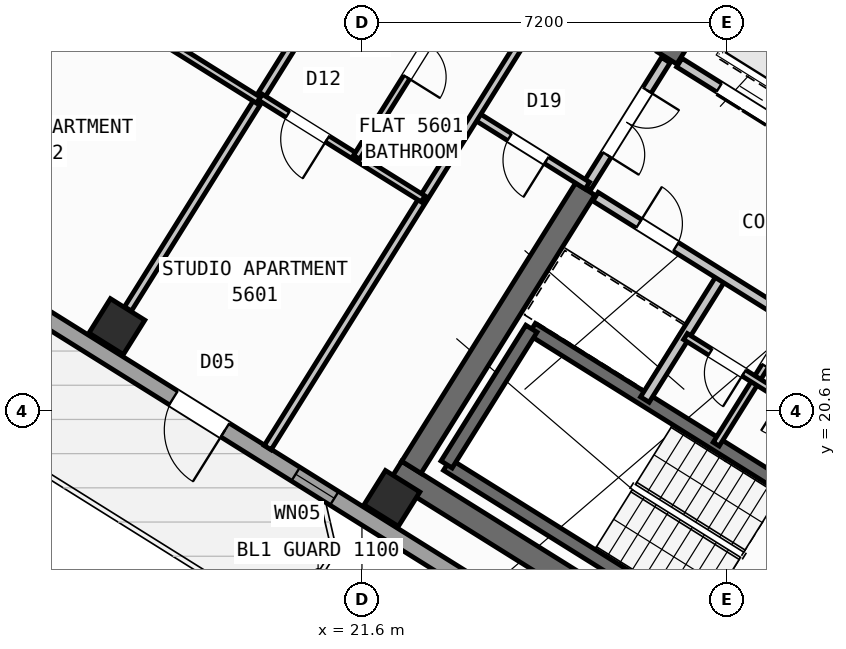
"""IFC4 building model, lengths in metres.
Left out: names, types, materials, properties, quantities, classifications, styles, units other than length and angle.
Written with IfcOpenShell. Run it as: python <this file> out.ifc"""

import sys

from ifc_helpers import new_model, si_unit, direction, frame, frame_2d, origin, origin_2d, place, context, subcontext, project, spatial, rectangle, hollow_rectangle, extrude, source, transform, mapped, element, fill, save


model = new_model("IFC4")
c1 = context("Model", 3, precision=1e-05, world=origin(), true_north=direction((0.0, 1.0)))
c2 = subcontext(c1, "Body", "Model", "MODEL_VIEW")
j1 = project(units=[si_unit("LENGTHUNIT", "METRE"), si_unit("PLANEANGLEUNIT", "RADIAN")], contexts=[c1])
p1 = place(None, origin())
s1 = spatial("IfcSite", under=j1, at=p1, CompositionType="ELEMENT")
p2 = place(p1, origin())
s2 = spatial("IfcBuilding", under=s1, at=p2, CompositionType="ELEMENT")
p3 = place(p2, frame((0.0, 0.0, 222.0)))
s3 = spatial("IfcBuildingStorey", under=s2, at=p3, CompositionType="ELEMENT", Elevation=222.0)
p4 = place(p3, frame((40.531, 24.036, 0.0), z_axis=(0.0, 0.0, 1.0), x_axis=(-0.848048787466, 0.529918157905, 0.0)))
e1 = element("IfcWall", 1, at=p4, inside=s3, PredefinedType="SHEAR", context=c2, shape_type="SweptSolid", body=[
    extrude(rectangle(XDim=13.04, YDim=0.45, at=frame_2d((6.52, 0.0))), origin(), (0.0, 0.0, 1.0), 3.35),
])
p5 = place(p3, frame((33.324, 12.503, 0.0), z_axis=(0.0, 0.0, 1.0), x_axis=(-0.848043529849, 0.529926571782, 0.0)))
e2 = element("IfcWall", 2, at=p5, inside=s3, PredefinedType="SHEAR", context=c2, shape_type="SweptSolid", body=[
    extrude(rectangle(XDim=13.04, YDim=0.45, at=frame_2d((6.52, 0.0))), origin(), (0.0, 0.0, 1.0), 3.35),
])
p6 = place(p3, frame((29.544, 30.636, 0.0), z_axis=(0.0, 0.0, 1.0), x_axis=(-0.529902075036, -0.848058836916, 0.0)))
e3 = element("IfcWall", 3, at=p6, inside=s3, PredefinedType="SHEAR", context=c2, shape_type="SweptSolid", body=[
    extrude(rectangle(XDim=3.625, YDim=0.45, at=frame_2d((1.812, 0.0))), origin(), (0.0, 0.0, 1.0), 3.35),
])
p7 = place(p3, frame((26.007, 24.976, 0.0), z_axis=(0.0, 0.0, 1.0), x_axis=(-0.529931155655, -0.848040665456, 0.0)))
e4 = element("IfcWall", 4, at=p7, inside=s3, PredefinedType="SHEAR", context=c2, shape_type="SweptSolid", body=[
    extrude(rectangle(XDim=6.475, YDim=0.45, at=frame_2d((3.238, 0.0))), origin(), (0.0, 0.0, 1.0), 3.35),
])
m1 = source(origin(), c2, "Body", "SweptSolid", [
    extrude(hollow_rectangle(XDim=0.8, YDim=0.8, WallThickness=0.032, at=origin_2d()), origin(), (0.0, 0.0, 1.0), 3.6),
])
for number, where, z_axis, x_axis in (
    (5, (22.191, 18.87, 0.0), (0.0, 0.0, 1.0), (-0.848, 0.53, 0.0)),
    (6, (16.764, 22.261, 0.0), (0.0, 0.0, 1.0), (-0.848, 0.53, 0.0)),
):
    element("IfcColumn", number, at=place(p3, frame(where, z_axis=z_axis, x_axis=x_axis)), inside=s3, PredefinedType="COLUMN", context=c2, shape_type="MappedRepresentation", body=[
        mapped(m1, transform((0.0, 0.0, 0.0), scale=1.0)),
    ])
p8 = place(p3, frame((31.76, 12.183, 0.0), z_axis=(0.0, 0.0, 1.0), x_axis=(-0.848047074256, 0.529920899612, 0.0)))
e7 = element("IfcWall", 7, at=p8, inside=s3, PredefinedType="STANDARD", context=c2, shape_type="SweptSolid", body=[
    extrude(rectangle(XDim=30.652, YDim=0.32, at=frame_2d((15.326, 0.0))), origin(), (0.0, 0.0, 1.0), 3.35),
])
p9 = place(p8, frame((15.166, 0.0, 0.0)))
e8 = element("IfcOpeningElement", 8, at=p9, cuts=e7, PredefinedType="OPENING", context=c2, shape_type="SweptSolid", body=[
    extrude(rectangle(XDim=1.2, YDim=2.15, at=frame_2d((0.6, 1.075))), frame((0.0, 0.17, 0.0), z_axis=(0.0, -1.0, 0.0), x_axis=(1.0, 0.0, 0.0)), (0.0, 0.0, 1.0), 0.34),
])
p10 = place(p8, frame((2.24, 0.0, 0.9)))
e9 = element("IfcOpeningElement", 9, at=p10, cuts=e7, PredefinedType="OPENING", context=c2, shape_type="SweptSolid", body=[
    extrude(rectangle(XDim=1.65, YDim=1.45, at=frame_2d((0.825, 0.725))), frame((0.0, 0.17, 0.0), z_axis=(0.0, -1.0, 0.0), x_axis=(1.0, 0.0, 0.0)), (0.0, 0.0, 1.0), 0.34),
])
p11 = place(p8, frame((7.469, 0.0, 0.9)))
e10 = element("IfcOpeningElement", 10, at=p11, cuts=e7, PredefinedType="OPENING", context=c2, shape_type="SweptSolid", body=[
    extrude(rectangle(XDim=1.65, YDim=1.45, at=frame_2d((0.825, 0.725))), frame((0.0, 0.17, 0.0), z_axis=(0.0, -1.0, 0.0), x_axis=(1.0, 0.0, 0.0)), (0.0, 0.0, 1.0), 0.34),
])
p12 = place(p8, frame((12.623, 0.0, 1.0)))
e11 = element("IfcOpeningElement", 11, at=p12, cuts=e7, PredefinedType="OPENING", context=c2, shape_type="SweptSolid", body=[
    extrude(rectangle(XDim=0.9, YDim=1.25, at=frame_2d((0.45, 0.625))), frame((0.0, 0.17, 0.0), z_axis=(0.0, -1.0, 0.0), x_axis=(1.0, 0.0, 0.0)), (0.0, 0.0, 1.0), 0.34),
])
p13 = place(p8, frame((19.583, 0.0, 1.0)))
e12 = element("IfcOpeningElement", 12, at=p13, cuts=e7, PredefinedType="OPENING", context=c2, shape_type="SweptSolid", body=[
    extrude(rectangle(XDim=0.9, YDim=1.25, at=frame_2d((0.45, 0.625))), frame((0.0, 0.17, 0.0), z_axis=(0.0, -1.0, 0.0), x_axis=(1.0, 0.0, 0.0)), (0.0, 0.0, 1.0), 0.34),
])
p14 = place(p8, frame((22.033, 0.0, 1.0)))
e13 = element("IfcOpeningElement", 13, at=p14, cuts=e7, PredefinedType="OPENING", context=c2, shape_type="SweptSolid", body=[
    extrude(rectangle(XDim=0.9, YDim=1.25, at=frame_2d((0.45, 0.625))), frame((0.0, 0.17, 0.0), z_axis=(0.0, -1.0, 0.0), x_axis=(1.0, 0.0, 0.0)), (0.0, 0.0, 1.0), 0.34),
])
p15 = place(p8, frame((27.666, 0.0, 0.9)))
e14 = element("IfcOpeningElement", 14, at=p15, cuts=e7, PredefinedType="OPENING", context=c2, shape_type="SweptSolid", body=[
    extrude(rectangle(XDim=1.35, YDim=1.45, at=frame_2d((0.675, 0.725))), frame((0.0, 0.17, 0.0), z_axis=(0.0, -1.0, 0.0), x_axis=(1.0, 0.0, 0.0)), (0.0, 0.0, 1.0), 0.34),
])
p16 = place(p3, frame((29.605, 15.581, 0.0), z_axis=(0.0, 0.0, 1.0), x_axis=(-0.848036911448, 0.529937163087, 0.0)))
e15 = element("IfcWall", 15, at=p16, inside=s3, PredefinedType="SHEAR", context=c2, shape_type="SweptSolid", body=[
    extrude(rectangle(XDim=7.46, YDim=0.26, at=frame_2d((3.73, 0.0))), origin(), (0.0, 0.0, 1.0), 3.35),
])
p17 = place(p3, frame((31.28, 18.261, 0.0), z_axis=(0.0, 0.0, 1.0), x_axis=(-0.848051618787, 0.529913626805, 0.0)))
e16 = element("IfcWall", 16, at=p17, inside=s3, PredefinedType="SHEAR", context=c2, shape_type="SweptSolid", body=[
    extrude(rectangle(XDim=7.46, YDim=0.26, at=frame_2d((3.73, 0.0))), origin(), (0.0, 0.0, 1.0), 3.35),
])
p18 = place(p17, frame((0.36, 0.0, 0.0)))
e17 = element("IfcOpeningElement", 17, at=p18, cuts=e16, PredefinedType="OPENING", context=c2, shape_type="SweptSolid", body=[
    extrude(rectangle(XDim=0.86, YDim=2.05, at=frame_2d((0.43, 1.025))), frame((0.0, 0.14, 0.0), z_axis=(0.0, -1.0, 0.0), x_axis=(1.0, 0.0, 0.0)), (0.0, 0.0, 1.0), 0.28),
])
p19 = place(p3, frame((31.288, 18.256, 0.0), z_axis=(0.0, 0.0, 1.0), x_axis=(-0.529943379326, -0.848033026897, 0.0)))
e18 = element("IfcWall", 18, at=p19, inside=s3, PredefinedType="SHEAR", context=c2, shape_type="SweptSolid", body=[
    extrude(rectangle(XDim=3.16, YDim=0.26, at=frame_2d((1.58, 0.0))), origin(), (0.0, 0.0, 1.0), 3.35),
])
p20 = place(p3, frame((24.945, 22.22, 0.0), z_axis=(0.0, 0.0, 1.0), x_axis=(-0.529908658664, -0.84805472316, 0.0)))
e19 = element("IfcWall", 19, at=p20, inside=s3, PredefinedType="SHEAR", context=c2, shape_type="SweptSolid", body=[
    extrude(rectangle(XDim=3.16, YDim=0.26, at=frame_2d((1.58, 0.0))), origin(), (0.0, 0.0, 1.0), 3.35),
])
p21 = place(p3, frame((31.822, 24.998, 0.0), z_axis=(0.0, 0.0, 1.0), x_axis=(-0.848054125777, 0.529909614701, 0.0)))
e20 = element("IfcWall", 20, at=p21, inside=s3, PredefinedType="STANDARD", context=c2, shape_type="SweptSolid", body=[
    extrude(rectangle(XDim=4.668, YDim=0.2, at=frame_2d((2.334, 0.0))), origin(), (0.0, 0.0, 1.0), 3.34),
])
p22 = place(p21, frame((0.52, 0.0, 0.0)))
e21 = element("IfcOpeningElement", 21, at=p22, cuts=e20, PredefinedType="OPENING", context=c2, shape_type="SweptSolid", body=[
    extrude(rectangle(XDim=1.2, YDim=2.15, at=frame_2d((0.6, 1.075))), frame((0.0, 0.11, 0.0), z_axis=(0.0, -1.0, 0.0), x_axis=(1.0, 0.0, 0.0)), (0.0, 0.0, 1.0), 0.22),
])
p23 = place(p21, frame((2.54, 0.0, 0.0)))
e22 = element("IfcOpeningElement", 22, at=p23, cuts=e20, PredefinedType="OPENING", context=c2, shape_type="SweptSolid", body=[
    extrude(rectangle(XDim=1.2, YDim=2.15, at=frame_2d((0.6, 1.075))), frame((0.0, 0.11, 0.0), z_axis=(0.0, -1.0, 0.0), x_axis=(1.0, 0.0, 0.0)), (0.0, 0.0, 1.0), 0.22),
])
p24 = place(p3, frame((33.363, 27.69, 0.0), z_axis=(0.0, 0.0, 1.0), x_axis=(-0.84804957148, 0.529916903215, 0.0)))
e23 = element("IfcWall", 23, at=p24, inside=s3, PredefinedType="STANDARD", context=c2, shape_type="SweptSolid", body=[
    extrude(rectangle(XDim=4.548, YDim=0.2, at=frame_2d((2.274, 0.0))), origin(), (0.0, 0.0, 1.0), 3.34),
])
p25 = place(p3, frame((28.71, 23.263, 0.0), z_axis=(0.0, 0.0, 1.0), x_axis=(-0.529907497854, -0.848055448493, 0.0)))
e24 = element("IfcWall", 24, at=p25, inside=s3, PredefinedType="STANDARD", context=c2, shape_type="SweptSolid", body=[
    extrude(rectangle(XDim=2.88, YDim=0.2, at=frame_2d((1.44, 0.0))), origin(), (0.0, 0.0, 1.0), 3.34),
])
p26 = place(p3, frame((31.525, 21.504, 0.0), z_axis=(0.0, 0.0, 1.0), x_axis=(-0.848042066329, 0.529928913853, 0.0)))
e25 = element("IfcWall", 25, at=p26, inside=s3, PredefinedType="STANDARD", context=c2, shape_type="SweptSolid", body=[
    extrude(rectangle(XDim=6.268, YDim=0.2, at=frame_2d((3.134, 0.0))), origin(), (0.0, 0.0, 1.0), 3.34),
])
p27 = place(p26, frame((4.4, 0.0, 0.0)))
e26 = element("IfcOpeningElement", 26, at=p27, cuts=e25, PredefinedType="OPENING", context=c2, shape_type="SweptSolid", body=[
    extrude(rectangle(XDim=0.86, YDim=2.05, at=frame_2d((0.43, 1.025))), frame((0.0, 0.11, 0.0), z_axis=(0.0, -1.0, 0.0), x_axis=(1.0, 0.0, 0.0)), (0.0, 0.0, 1.0), 0.22),
])
p28 = place(p26, frame((0.35, 0.0, 0.0)))
e27 = element("IfcOpeningElement", 27, at=p28, cuts=e25, PredefinedType="OPENING", context=c2, shape_type="SweptSolid", body=[
    extrude(rectangle(XDim=0.86, YDim=2.05, at=frame_2d((0.43, 1.025))), frame((0.0, 0.11, 0.0), z_axis=(0.0, -1.0, 0.0), x_axis=(1.0, 0.0, 0.0)), (0.0, 0.0, 1.0), 0.22),
])
p29 = place(p3, frame((30.117, 22.384, 0.0), z_axis=(0.0, 0.0, 1.0), x_axis=(-0.529951914384, -0.848027693204, 0.0)))
e28 = element("IfcWall", 28, at=p29, inside=s3, PredefinedType="PLUMBINGWALL", context=c2, shape_type="SweptSolid", body=[
    extrude(rectangle(XDim=1.4, YDim=0.14, at=frame_2d((0.7, 0.0))), origin(), (0.0, 0.0, 1.0), 3.34),
])
p30 = place(p29, frame((0.28, 0.0, 0.0)))
e29 = element("IfcOpeningElement", 29, at=p30, cuts=e28, PredefinedType="OPENING", context=c2, shape_type="SweptSolid", body=[
    extrude(rectangle(XDim=0.78, YDim=2.05, at=frame_2d((0.39, 1.025))), frame((0.0, 0.08, 0.0), z_axis=(0.0, -1.0, 0.0), x_axis=(1.0, 0.0, 0.0)), (0.0, 0.0, 1.0), 0.16),
])
p31 = place(p3, frame((29.375, 21.196, 0.0), z_axis=(0.0, 0.0, 1.0), x_axis=(-0.529865479138, -0.848081702443, 0.0)))
e30 = element("IfcWall", 30, at=p31, inside=s3, PredefinedType="PLUMBINGWALL", context=c2, shape_type="SweptSolid", body=[
    extrude(rectangle(XDim=1.48, YDim=0.14, at=frame_2d((0.74, 0.0))), origin(), (0.0, 0.0, 1.0), 3.34),
])
p32 = place(p3, frame((30.766, 20.327, 0.0), z_axis=(0.0, 0.0, 1.0), x_axis=(-0.848052663127, 0.529911955482, 0.0)))
e31 = element("IfcWall", 31, at=p32, inside=s3, PredefinedType="PLUMBINGWALL", context=c2, shape_type="SweptSolid", body=[
    extrude(rectangle(XDim=3.28, YDim=0.14, at=frame_2d((1.64, 0.0))), origin(), (0.0, 0.0, 1.0), 3.34),
])
p33 = place(p32, frame((0.25, 0.0, 0.0)))
e32 = element("IfcOpeningElement", 32, at=p33, cuts=e31, PredefinedType="OPENING", context=c2, shape_type="SweptSolid", body=[
    extrude(rectangle(XDim=0.78, YDim=2.05, at=frame_2d((0.39, 1.025))), frame((0.0, 0.08, 0.0), z_axis=(0.0, -1.0, 0.0), x_axis=(1.0, 0.0, 0.0)), (0.0, 0.0, 1.0), 0.16),
])
p34 = place(p32, frame((1.92, 0.0, 0.0)))
e33 = element("IfcOpeningElement", 33, at=p34, cuts=e31, PredefinedType="OPENING", context=c2, shape_type="SweptSolid", body=[
    extrude(rectangle(XDim=0.78, YDim=2.05, at=frame_2d((0.39, 1.025))), frame((0.0, 0.08, 0.0), z_axis=(0.0, -1.0, 0.0), x_axis=(1.0, 0.0, 0.0)), (0.0, 0.0, 1.0), 0.16),
])
p35 = place(p3, frame((27.596, 27.52, 0.0), z_axis=(0.0, 0.0, 1.0), x_axis=(-0.529865479138, -0.848081702443, 0.0)))
e34 = element("IfcWall", 34, at=p35, inside=s3, PredefinedType="STANDARD", context=c2, shape_type="SweptSolid", body=[
    extrude(rectangle(XDim=2.96, YDim=0.2, at=frame_2d((1.48, 0.0))), origin(), (0.0, 0.0, 1.0), 3.34),
])
p36 = place(p35, frame((0.7, 0.0, 0.0)))
e35 = element("IfcOpeningElement", 35, at=p36, cuts=e34, PredefinedType="OPENING", context=c2, shape_type="SweptSolid", body=[
    extrude(rectangle(XDim=1.5, YDim=2.15, at=frame_2d((0.75, 1.075))), frame((0.0, 0.11, 0.0), z_axis=(0.0, -1.0, 0.0), x_axis=(1.0, 0.0, 0.0)), (0.0, 0.0, 1.0), 0.22),
])
p37 = place(p3, frame((26.049, 25.044, 0.0), z_axis=(0.0, 0.0, 1.0), x_axis=(-0.848050851465, 0.529914854792, 0.0)))
e36 = element("IfcWall", 36, at=p37, inside=s3, PredefinedType="PARTITIONING", context=c2, shape_type="SweptSolid", body=[
    extrude(rectangle(XDim=2.61, YDim=0.16, at=frame_2d((1.305, 0.0))), origin(), (0.0, 0.0, 1.0), 2.825),
])
p38 = place(p37, frame((0.95, 0.0, 0.0)))
e37 = element("IfcOpeningElement", 37, at=p38, cuts=e36, PredefinedType="OPENING", context=c2, shape_type="SweptSolid", body=[
    extrude(rectangle(XDim=0.86, YDim=2.05, at=frame_2d((0.43, 1.025))), frame((0.0, 0.09, 0.0), z_axis=(0.0, -1.0, 0.0), x_axis=(1.0, 0.0, 0.0)), (0.0, 0.0, 1.0), 0.18),
])
p39 = place(p3, frame((25.198, 28.606, 0.0), z_axis=(0.0, 0.0, 1.0), x_axis=(-0.529926497642, -0.848043576178, 0.0)))
e38 = element("IfcWall", 38, at=p39, inside=s3, PredefinedType="PARTITIONING", context=c2, shape_type="SweptSolid", body=[
    extrude(rectangle(XDim=10.3, YDim=0.16, at=frame_2d((5.15, 0.0))), origin(), (0.0, 0.0, 1.0), 3.34),
])
p40 = place(p3, frame((20.414, 28.103, 0.0), z_axis=(0.0, 0.0, 1.0), x_axis=(-0.529934553702, -0.848038542045, 0.0)))
e39 = element("IfcWall", 39, at=p40, inside=s3, PredefinedType="PARTITIONING", context=c2, shape_type="SweptSolid", body=[
    extrude(rectangle(XDim=6.476, YDim=0.16, at=frame_2d((3.238, 0.0))), origin(), (0.0, 0.0, 1.0), 2.825),
])
p41 = place(p3, frame((22.807, 24.781, 0.0), z_axis=(0.0, 0.0, 1.0), x_axis=(-0.84803087207, 0.529946827537, 0.0)))
e40 = element("IfcWall", 40, at=p41, inside=s3, PredefinedType="PLUMBINGWALL", context=c2, shape_type="SweptSolid", body=[
    extrude(rectangle(XDim=3.79, YDim=0.14, at=frame_2d((1.895, 0.0))), origin(), (0.0, 0.0, 1.0), 3.34),
])
p42 = place(p41, frame((2.23, 0.0, 0.0)))
e41 = element("IfcOpeningElement", 41, at=p42, cuts=e40, PredefinedType="OPENING", context=c2, shape_type="SweptSolid", body=[
    extrude(rectangle(XDim=0.92, YDim=2.08, at=frame_2d((0.46, 1.04))), frame((0.0, 0.08, 0.0), z_axis=(0.0, -1.0, 0.0), x_axis=(1.0, 0.0, 0.0)), (0.0, 0.0, 1.0), 0.16),
])
p43 = place(p3, frame((23.883, 29.427, 0.0), z_axis=(0.0, 0.0, 1.0), x_axis=(-0.529950281337, -0.84802871373, 0.0)))
e42 = element("IfcWall", 42, at=p43, inside=s3, PredefinedType="PLUMBINGWALL", context=c2, shape_type="SweptSolid", body=[
    extrude(rectangle(XDim=4.51, YDim=0.14, at=frame_2d((2.255, 0.0))), origin(), (0.0, 0.0, 1.0), 2.995),
])
p44 = place(p43, frame((1.865, 0.0, 0.0)))
e43 = element("IfcOpeningElement", 43, at=p44, cuts=e42, PredefinedType="OPENING", context=c2, shape_type="SweptSolid", body=[
    extrude(rectangle(XDim=0.78, YDim=2.05, at=frame_2d((0.39, 1.025))), frame((0.0, 0.08, 0.0), z_axis=(0.0, -1.0, 0.0), x_axis=(1.0, 0.0, 0.0)), (0.0, 0.0, 1.0), 0.16),
])
p45 = place(p3, frame((19.556, 26.73, 0.0), z_axis=(0.0, 0.0, 1.0), x_axis=(-0.848043949058, 0.52992590092, 0.0)))
e44 = element("IfcWall", 44, at=p45, inside=s3, PredefinedType="PLUMBINGWALL", context=c2, shape_type="SweptSolid", body=[
    extrude(rectangle(XDim=12.92, YDim=0.14, at=frame_2d((6.46, 0.0))), origin(), (0.0, 0.0, 1.0), 3.34),
])
p46 = place(p45, frame((5.849, 0.0, 0.0)))
e45 = element("IfcOpeningElement", 45, at=p46, cuts=e44, PredefinedType="OPENING", context=c2, shape_type="SweptSolid", body=[
    extrude(rectangle(XDim=0.92, YDim=2.08, at=frame_2d((0.46, 1.04))), frame((0.0, 0.08, 0.0), z_axis=(0.0, -1.0, 0.0), x_axis=(1.0, 0.0, 0.0)), (0.0, 0.0, 1.0), 0.16),
])
p47 = place(p3, frame((41.936, 26.012, 0.0), z_axis=(0.0, 0.0, 1.0), x_axis=(-0.848051154596, 0.529914369676, 0.0)))
e46 = element("IfcWall", 46, at=p47, inside=s3, PredefinedType="PARTITIONING", context=c2, shape_type="SweptSolid", body=[
    extrude(rectangle(XDim=15.57, YDim=0.16, at=frame_2d((7.785, 0.0))), origin(), (0.0, 0.0, 1.0), 3.34),
])
p48 = place(p47, frame((3.415, 0.0, 0.0)))
e47 = element("IfcOpeningElement", 47, at=p48, cuts=e46, PredefinedType="OPENING", context=c2, shape_type="SweptSolid", body=[
    extrude(rectangle(XDim=1.0, YDim=2.1, at=frame_2d((0.5, 1.05))), frame((0.0, 0.09, 0.0), z_axis=(0.0, -1.0, 0.0), x_axis=(1.0, 0.0, 0.0)), (0.0, 0.0, 1.0), 0.18),
])
p49 = place(p47, frame((10.565, 0.0, 0.0)))
e48 = element("IfcOpeningElement", 48, at=p49, cuts=e46, PredefinedType="OPENING", context=c2, shape_type="SweptSolid", body=[
    extrude(rectangle(XDim=1.0, YDim=2.1, at=frame_2d((0.5, 1.05))), frame((0.0, 0.09, 0.0), z_axis=(0.0, -1.0, 0.0), x_axis=(1.0, 0.0, 0.0)), (0.0, 0.0, 1.0), 0.18),
])
m2 = source(origin(), c2, "Body", "SweptSolid", [
    extrude(rectangle(XDim=1.2, YDim=2.15, at=frame_2d((0.6, 1.075))), frame((0.0, 0.025, 0.0), z_axis=(0.0, -1.0, 0.0), x_axis=(1.0, 0.0, 0.0)), (0.0, 0.0, 1.0), 0.05),
])
p50 = place(p9, origin())
e49 = element("IfcDoor", 49, at=p50, inside=s3, OperationType="SINGLE_SWING_LEFT", PredefinedType="DOOR", context=c2, shape_type="MappedRepresentation", body=[
    mapped(m2, transform((0.0, 0.0, 0.0), scale=1.0)),
])
fill(e8, e49)
m3 = source(origin(), c2, "Body", "SweptSolid", [
    extrude(rectangle(XDim=0.9, YDim=1.25, at=frame_2d((0.45, 0.625))), frame((0.0, 0.03, 0.0), z_axis=(0.0, -1.0, 0.0), x_axis=(1.0, 0.0, 0.0)), (0.0, 0.0, 1.0), 0.06),
])
p51 = place(p12, origin())
e50 = element("IfcWindow", 50, at=p51, inside=s3, PartitioningType="SINGLE_PANEL", PredefinedType="WINDOW", context=c2, shape_type="MappedRepresentation", body=[
    mapped(m3, transform((0.0, 0.0, 0.0), scale=1.0)),
])
fill(e11, e50)
p52 = place(p23, origin())
e51 = element("IfcDoor", 51, at=p52, inside=s3, OperationType="DOUBLE_DOOR_SLIDING", PredefinedType="DOOR", context=c2, shape_type="MappedRepresentation", body=[
    mapped(m2, transform((0.0, 0.0, 0.0), scale=1.0)),
])
fill(e22, e51)
m4 = source(origin(), c2, "Body", "SweptSolid", [
    extrude(rectangle(XDim=0.86, YDim=2.05, at=frame_2d((0.43, 1.025))), frame((0.0, 0.025, 0.0), z_axis=(0.0, -1.0, 0.0), x_axis=(1.0, 0.0, 0.0)), (0.0, 0.0, 1.0), 0.05),
])
p53 = place(p27, frame((0.86, 0.0, 0.0), z_axis=(0.0, 0.0, 1.0), x_axis=(-1.0, 0.0, 0.0)))
e52 = element("IfcDoor", 52, at=p53, inside=s3, OperationType="SINGLE_SWING_LEFT", PredefinedType="DOOR", context=c2, shape_type="MappedRepresentation", body=[
    mapped(m4, transform((0.0, 0.0, 0.0), scale=1.0)),
])
fill(e26, e52)
m5 = source(origin(), c2, "Body", "SweptSolid", [
    extrude(rectangle(XDim=0.78, YDim=2.05, at=frame_2d((0.39, 1.025))), frame((0.0, 0.025, 0.0), z_axis=(0.0, -1.0, 0.0), x_axis=(1.0, 0.0, 0.0)), (0.0, 0.0, 1.0), 0.05),
])
p54 = place(p30, origin())
e53 = element("IfcDoor", 53, at=p54, inside=s3, OperationType="SINGLE_SWING_LEFT", PredefinedType="DOOR", context=c2, shape_type="MappedRepresentation", body=[
    mapped(m5, transform((0.0, 0.0, 0.0), scale=1.0)),
])
fill(e29, e53)
p55 = place(p34, origin())
e54 = element("IfcDoor", 54, at=p55, inside=s3, OperationType="SINGLE_SWING_LEFT", PredefinedType="DOOR", context=c2, shape_type="MappedRepresentation", body=[
    mapped(m5, transform((0.0, 0.0, 0.0), scale=1.0)),
])
fill(e33, e54)
p56 = place(p38, origin())
e55 = element("IfcDoor", 55, at=p56, inside=s3, OperationType="SINGLE_SWING_LEFT", PredefinedType="DOOR", context=c2, shape_type="MappedRepresentation", body=[
    mapped(m4, transform((0.0, 0.0, 0.0), scale=1.0)),
])
fill(e37, e55)
m6 = source(origin(), c2, "Body", "SweptSolid", [
    extrude(rectangle(XDim=1.5, YDim=2.15, at=frame_2d((0.75, 1.075))), frame((0.0, 0.025, 0.0), z_axis=(0.0, -1.0, 0.0), x_axis=(1.0, 0.0, 0.0)), (0.0, 0.0, 1.0), 0.05),
])
p57 = place(p36, origin())
e56 = element("IfcDoor", 56, at=p57, inside=s3, OperationType="DOUBLE_DOOR_SINGLE_SWING", PredefinedType="DOOR", context=c2, shape_type="MappedRepresentation", body=[
    mapped(m6, transform((0.0, 0.0, 0.0), scale=1.0)),
])
fill(e35, e56)
m7 = source(origin(), c2, "Body", "SweptSolid", [
    extrude(rectangle(XDim=0.92, YDim=2.08, at=frame_2d((0.46, 1.04))), frame((0.0, 0.025, 0.0), z_axis=(0.0, -1.0, 0.0), x_axis=(1.0, 0.0, 0.0)), (0.0, 0.0, 1.0), 0.05),
])
p58 = place(p42, origin())
e57 = element("IfcDoor", 57, at=p58, inside=s3, OperationType="SINGLE_SWING_LEFT", PredefinedType="DOOR", context=c2, shape_type="MappedRepresentation", body=[
    mapped(m7, transform((0.0, 0.0, 0.0), scale=1.0)),
])
fill(e41, e57)
p59 = place(p44, origin())
e58 = element("IfcDoor", 58, at=p59, inside=s3, OperationType="SINGLE_SWING_RIGHT", PredefinedType="DOOR", context=c2, shape_type="MappedRepresentation", body=[
    mapped(m5, transform((0.0, 0.0, 0.0), scale=1.0)),
])
fill(e43, e58)
save(model, sys.argv[1])
